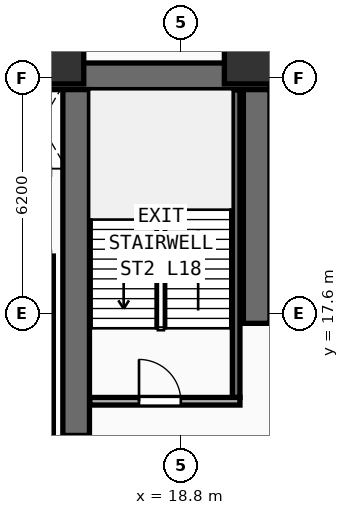
"""IFC4 building model, lengths in metres.
Left out: names, types, materials, properties, quantities, classifications, styles, units other than length and angle.
Written with IfcOpenShell. Run it as: python <this file> out.ifc"""

import sys

from ifc_helpers import new_model, si_unit, direction, frame, frame_2d, origin, origin_2d, place, context, subcontext, project, spatial, rectangle, extrude, element, fill, save


model = new_model("IFC4")
c1 = context("Model", 3, precision=1e-05, world=origin(), true_north=direction((0.0, 1.0)))
c2 = subcontext(c1, "Body", "Model", "MODEL_VIEW")
j1 = project(units=[si_unit("LENGTHUNIT", "METRE"), si_unit("PLANEANGLEUNIT", "RADIAN")], contexts=[c1])
p1 = place(None, origin())
s1 = spatial("IfcSite", under=j1, at=p1, CompositionType="ELEMENT")
p2 = place(p1, origin())
s2 = spatial("IfcBuilding", under=s1, at=p2, CompositionType="ELEMENT")
p3 = place(p2, frame((0.0, 0.0, 71.4)))
s3 = spatial("IfcBuildingStorey", under=s2, at=p3, CompositionType="ELEMENT", Elevation=71.4)
p4 = place(p3, frame((7.1, 23.85, 0.0), z_axis=(0.0, 0.0, 1.0), x_axis=(1.0, 0.0, 0.0)))
e1 = element("IfcWall", 1, at=p4, inside=s3, PredefinedType="SHEAR", context=c2, shape_type="SweptSolid", body=[
    extrude(rectangle(XDim=14.05, YDim=0.7, at=frame_2d((7.025, 0.0))), origin(), (0.0, 0.0, 1.0), 3.54),
])
p5 = place(p3, frame((20.8, 17.35, 0.0), z_axis=(0.0, 0.0, 1.0), x_axis=(0.0, 1.0, 0.0)))
e2 = element("IfcWall", 2, at=p5, inside=s3, PredefinedType="SHEAR", context=c2, shape_type="SweptSolid", body=[
    extrude(rectangle(XDim=6.15, YDim=0.7, at=frame_2d((3.075, 0.0))), origin(), (0.0, 0.0, 1.0), 3.54),
])
p6 = place(p3, frame((16.05, 14.4, 0.0), z_axis=(0.0, 0.0, 1.0), x_axis=(0.0, 1.0, 0.0)))
e3 = element("IfcWall", 3, at=p6, inside=s3, PredefinedType="SHEAR", context=c2, shape_type="SweptSolid", body=[
    extrude(rectangle(XDim=9.1, YDim=0.7, at=frame_2d((4.55, 0.0))), origin(), (0.0, 0.0, 1.0), 3.54),
])
for number, where, z_axis, x_axis in (
    (4, (15.45, 24.45, 0.0), (0.0, 0.0, 1.0), (1.0, 0.0, 0.0)),
    (5, (20.75, 24.45, 0.0), (0.0, 0.0, 1.0), (1.0, 0.0, 0.0)),
):
    element("IfcColumn", number, at=place(p3, frame(where, z_axis=z_axis, x_axis=x_axis)), inside=s3, PredefinedType="COLUMN", context=c2, shape_type="SweptSolid", body=[
        extrude(rectangle(XDim=1.6, YDim=1.6, at=origin_2d()), origin(), (0.0, 0.0, 1.0), 3.54),
    ])
p7 = place(p3, frame((20.26, 15.4, 0.0), z_axis=(0.0, 0.0, 1.0), x_axis=(0.0, 1.0, 0.0)))
e6 = element("IfcWall", 6, at=p7, inside=s3, PredefinedType="SHEAR", context=c2, shape_type="SweptSolid", body=[
    extrude(rectangle(XDim=8.09, YDim=0.2, at=frame_2d((4.045, 0.0))), origin(), (0.0, 0.0, 1.0), 3.54),
])
p8 = place(p3, frame((16.41, 15.3, 0.0), z_axis=(0.0, 0.0, 1.0), x_axis=(1.0, 0.0, 0.0)))
e7 = element("IfcWall", 7, at=p8, inside=s3, PredefinedType="PARTITIONING", context=c2, shape_type="SweptSolid", body=[
    extrude(rectangle(XDim=3.95, YDim=0.2, at=frame_2d((1.975, 0.0))), origin(), (0.0, 0.0, 1.0), 3.54),
])
p9 = place(p8, frame((1.294, 0.0, 0.0)))
e8 = element("IfcOpeningElement", 8, at=p9, cuts=e7, PredefinedType="OPENING", context=c2, shape_type="SweptSolid", body=[
    extrude(rectangle(XDim=1.1, YDim=2.2, at=frame_2d((0.55, 1.1))), frame((0.0, 0.11, 0.0), z_axis=(0.0, -1.0, 0.0), x_axis=(1.0, 0.0, 0.0)), (0.0, 0.0, 1.0), 0.22),
])
p10 = place(p3, frame((15.35, 14.22, 0.0), z_axis=(0.0, 0.0, 1.0), x_axis=(0.0, 1.0, 0.0)))
e9 = element("IfcWall", 9, at=p10, inside=s3, PredefinedType="PARTITIONING", context=c2, shape_type="SweptSolid", body=[
    extrude(rectangle(XDim=2.23, YDim=0.2, at=frame_2d((1.115, 0.0))), origin(), (0.0, 0.0, 1.0), 3.54),
])
p11 = place(p3, frame((15.35, 16.45, 0.0), z_axis=(0.0, 0.0, 1.0), x_axis=(0.0, 1.0, 0.0)))
e10 = element("IfcWall", 10, at=p11, inside=s3, PredefinedType="PARTITIONING", context=c2, shape_type="SweptSolid", body=[
    extrude(rectangle(XDim=2.67, YDim=0.2, at=frame_2d((1.335, 0.0))), origin(), (0.0, 0.0, 1.0), 3.54),
])
p12 = place(p9, origin())
e11 = element("IfcDoor", 11, at=p12, inside=s3, OperationType="SINGLE_SWING_LEFT", PredefinedType="DOOR", context=c2, shape_type="SweptSolid", body=[
    extrude(rectangle(XDim=1.1, YDim=2.2, at=frame_2d((0.55, 1.1))), frame((0.0, 0.025, 0.0), z_axis=(0.0, -1.0, 0.0), x_axis=(1.0, 0.0, 0.0)), (0.0, 0.0, 1.0), 0.05),
])
fill(e8, e11)
save(model, sys.argv[1])
